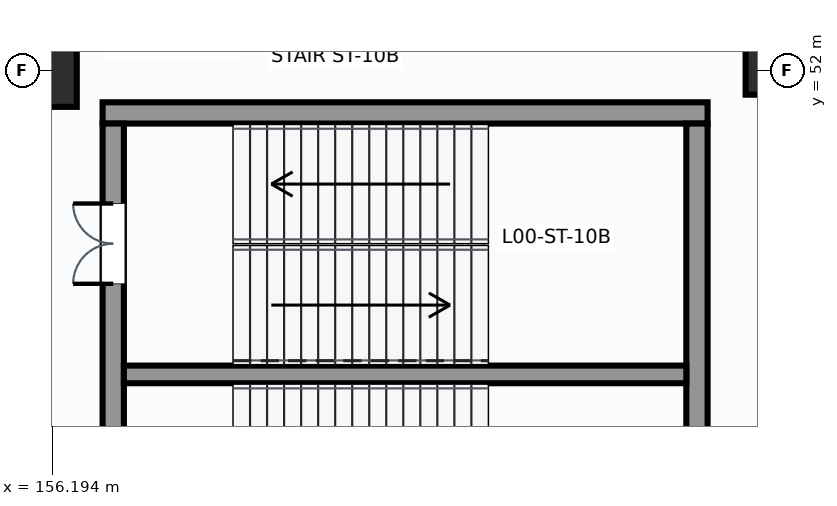
"""IFC4 building model, lengths in metres.
Left out: names, types, materials, properties, quantities, classifications, styles, units other than length and angle.
Written with IfcOpenShell. Run it as: python <this file> out.ifc"""

import sys

from ifc_helpers import new_model, si_unit, direction, frame, frame_2d, origin, origin_2d, place, context, subcontext, project, spatial, rectangle, extrude, element, fill, save


model = new_model("IFC4")
c1 = context("Model", 3, precision=1e-05, world=origin(), true_north=direction((0.0, 1.0)))
c2 = subcontext(c1, "Body", "Model", "MODEL_VIEW")
j1 = project(units=[si_unit("LENGTHUNIT", "METRE"), si_unit("PLANEANGLEUNIT", "RADIAN")], contexts=[c1])
p1 = place(None, origin())
s1 = spatial("IfcSite", under=j1, at=p1, CompositionType="ELEMENT")
p2 = place(p1, origin())
s2 = spatial("IfcBuilding", under=s1, at=p2, CompositionType="ELEMENT")
p3 = place(p2, origin())
s3 = spatial("IfcBuildingStorey", under=s2, at=p3, CompositionType="ELEMENT", Elevation=0.0)
p4 = place(p3, frame((156.0, 52.0, 0.0), z_axis=(0.0, 0.0, 1.0), x_axis=(1.0, 0.0, 0.0)))
e1 = element("IfcColumn", 1, at=p4, inside=s3, PredefinedType="COLUMN", context=c2, shape_type="SweptSolid", body=[
    extrude(rectangle(XDim=1.2, YDim=1.2, at=origin_2d()), origin(), (0.0, 0.0, 1.0), 5.4),
])
p5 = place(p3, frame((168.0, 52.0, 0.0), z_axis=(0.0, 0.0, 1.0), x_axis=(1.0, 0.0, 0.0)))
e2 = element("IfcColumn", 2, at=p5, inside=s3, PredefinedType="COLUMN", context=c2, shape_type="SweptSolid", body=[
    extrude(rectangle(XDim=0.8, YDim=0.8, at=origin_2d()), origin(), (0.0, 0.0, 1.0), 5.4),
])
p6 = place(p3, frame((157.025, 51.3, 0.0), z_axis=(0.0, 0.0, 1.0), x_axis=(1.0, 0.0, 0.0)))
e3 = element("IfcWall", 3, at=p6, inside=s3, PredefinedType="SHEAR", context=c2, shape_type="SweptSolid", body=[
    extrude(rectangle(XDim=9.95, YDim=0.35, at=frame_2d((4.975, 0.0))), origin(), (0.0, 0.0, 1.0), 5.4),
])
p7 = place(p3, frame((157.2, 42.875, 0.0), z_axis=(0.0, 0.0, 1.0), x_axis=(0.0, 1.0, 0.0)))
e4 = element("IfcWall", 4, at=p7, inside=s3, PredefinedType="SHEAR", context=c2, shape_type="SweptSolid", body=[
    extrude(rectangle(XDim=8.25, YDim=0.35, at=frame_2d((4.125, 0.0))), origin(), (0.0, 0.0, 1.0), 5.4),
])
p8 = place(p7, frame((1.275, 0.0, 0.0)))
e5 = element("IfcOpeningElement", 5, at=p8, cuts=e4, PredefinedType="OPENING", context=c2, shape_type="SweptSolid", body=[
    extrude(rectangle(XDim=1.4, YDim=2.2, at=frame_2d((0.7, 1.1))), frame((0.0, 0.185, 0.0), z_axis=(0.0, -1.0, 0.0), x_axis=(1.0, 0.0, 0.0)), (0.0, 0.0, 1.0), 0.37),
])
p9 = place(p7, frame((5.615, 0.0, 0.0)))
e6 = element("IfcOpeningElement", 6, at=p9, cuts=e4, PredefinedType="OPENING", context=c2, shape_type="SweptSolid", body=[
    extrude(rectangle(XDim=1.32, YDim=2.2, at=frame_2d((0.66, 1.1))), frame((0.0, 0.185, 0.0), z_axis=(0.0, -1.0, 0.0), x_axis=(1.0, 0.0, 0.0)), (0.0, 0.0, 1.0), 0.37),
])
p10 = place(p3, frame((166.8, 42.875, 0.0), z_axis=(0.0, 0.0, 1.0), x_axis=(0.0, 1.0, 0.0)))
e7 = element("IfcWall", 7, at=p10, inside=s3, PredefinedType="SHEAR", context=c2, shape_type="SweptSolid", body=[
    extrude(rectangle(XDim=8.25, YDim=0.35, at=frame_2d((4.125, 0.0))), origin(), (0.0, 0.0, 1.0), 5.4),
])
p11 = place(p3, frame((157.375, 47.0, 0.0), z_axis=(0.0, 0.0, 1.0), x_axis=(1.0, 0.0, 0.0)))
e8 = element("IfcWall", 8, at=p11, inside=s3, PredefinedType="SHEAR", context=c2, shape_type="SweptSolid", body=[
    extrude(rectangle(XDim=9.25, YDim=0.29, at=frame_2d((4.625, 0.0))), origin(), (0.0, 0.0, 1.0), 5.4),
])
p12 = place(p9, origin())
e9 = element("IfcDoor", 9, at=p12, inside=s3, OperationType="DOUBLE_DOOR_SINGLE_SWING", PredefinedType="DOOR", context=c2, shape_type="SweptSolid", body=[
    extrude(rectangle(XDim=1.32, YDim=2.2, at=frame_2d((0.66, 1.1))), frame((0.0, 0.025, 0.0), z_axis=(0.0, -1.0, 0.0), x_axis=(1.0, 0.0, 0.0)), (0.0, 0.0, 1.0), 0.05),
])
fill(e6, e9)
save(model, sys.argv[1])
